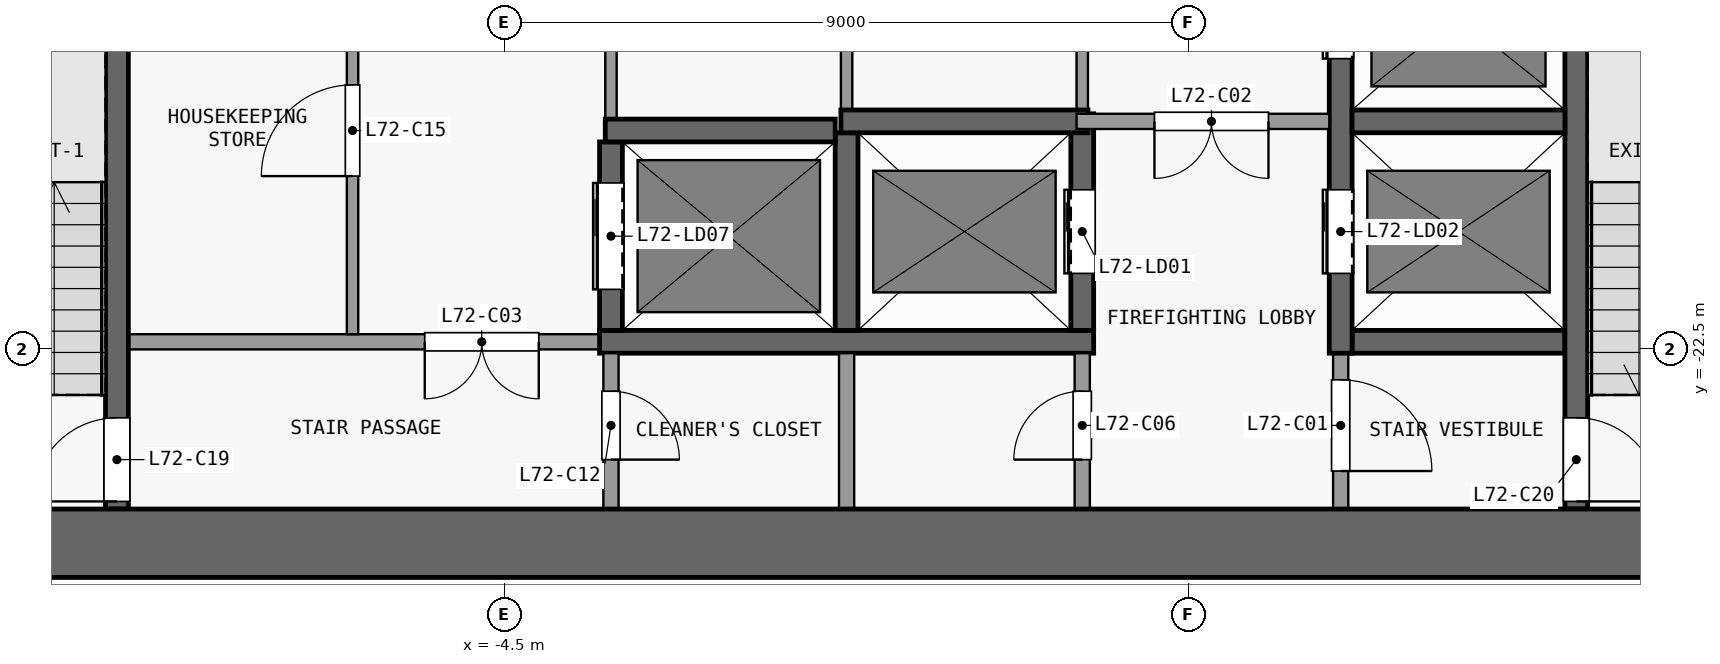
"""IFC4 building model, lengths in metres.
Left out: names, types, materials, properties, quantities, classifications, styles, units other than length and angle.
Written with IfcOpenShell. Run it as: python <this file> out.ifc"""

import sys

from ifc_helpers import new_model, si_unit, direction, frame, frame_2d, origin, place, context, subcontext, project, spatial, rectangle, extrude, element, fill, save


model = new_model("IFC4")
c1 = context("Model", 3, precision=1e-05, world=origin(), true_north=direction((0.0, 1.0)))
c2 = subcontext(c1, "Body", "Model", "MODEL_VIEW")
j1 = project(units=[si_unit("LENGTHUNIT", "METRE"), si_unit("PLANEANGLEUNIT", "RADIAN")], contexts=[c1])
p1 = place(None, origin())
s1 = spatial("IfcSite", under=j1, at=p1, CompositionType="ELEMENT")
p2 = place(p1, origin())
s2 = spatial("IfcBuilding", under=s1, at=p2, CompositionType="ELEMENT")
p3 = place(p2, frame((0.0, 0.0, 284.3)))
s3 = spatial("IfcBuildingStorey", under=s2, at=p3, CompositionType="ELEMENT", Elevation=284.3)
p4 = place(p3, frame((-13.1, -25.05, 0.0), z_axis=(0.0, 0.0, 1.0), x_axis=(1.0, 0.0, 0.0)))
e1 = element("IfcWall", 1, at=p4, inside=s3, PredefinedType="SHEAR", context=c2, shape_type="SweptSolid", body=[
    extrude(rectangle(XDim=26.2, YDim=0.9, at=frame_2d((13.1, 0.0))), origin(), (0.0, 0.0, 1.0), 3.3),
])
p5 = place(p3, frame((-3.25, -22.4, 0.0), z_axis=(0.0, 0.0, 1.0), x_axis=(-1.0, 0.0, 0.0)))
e2 = element("IfcWall", 2, at=p5, inside=s3, PredefinedType="PARTITIONING", context=c2, shape_type="SweptSolid", body=[
    extrude(rectangle(XDim=6.2, YDim=0.2, at=frame_2d((3.1, 0.0))), origin(), (0.0, 0.0, 1.0), 3.3),
])
p6 = place(p5, frame((0.8, 0.0, 0.0)))
e3 = element("IfcOpeningElement", 3, at=p6, cuts=e2, PredefinedType="OPENING", context=c2, shape_type="SweptSolid", body=[
    extrude(rectangle(XDim=1.5, YDim=2.1, at=frame_2d((0.75, 1.05))), frame((0.0, 0.11, 0.0), z_axis=(0.0, -1.0, 0.0), x_axis=(1.0, 0.0, 0.0)), (0.0, 0.0, 1.0), 0.22),
])
p7 = place(p3, frame((-3.25, -22.4, 0.0), z_axis=(0.0, 0.0, 1.0), x_axis=(1.0, 0.0, 0.0)))
e4 = element("IfcWall", 4, at=p7, inside=s3, PredefinedType="SHEAR", context=c2, shape_type="SweptSolid", body=[
    extrude(rectangle(XDim=6.5, YDim=0.3, at=frame_2d((3.25, 0.0))), origin(), (0.0, 0.0, 1.0), 3.3),
])
p8 = place(p3, frame((6.65, -22.4, 0.0), z_axis=(0.0, 0.0, 1.0), x_axis=(1.0, 0.0, 0.0)))
e5 = element("IfcWall", 5, at=p8, inside=s3, PredefinedType="SHEAR", context=c2, shape_type="SweptSolid", body=[
    extrude(rectangle(XDim=2.8, YDim=0.3, at=frame_2d((1.4, 0.0))), origin(), (0.0, 0.0, 1.0), 3.3),
])
p9 = place(p3, frame((-3.175, -19.62, 0.0), z_axis=(0.0, 0.0, 1.0), x_axis=(1.0, 0.0, 0.0)))
e6 = element("IfcWall", 6, at=p9, inside=s3, PredefinedType="SHEAR", context=c2, shape_type="SweptSolid", body=[
    extrude(rectangle(XDim=3.025, YDim=0.3, at=frame_2d((1.513, 0.0))), origin(), (0.0, 0.0, 1.0), 3.3),
])
p10 = place(p3, frame((-0.075, -19.5, 0.0), z_axis=(0.0, 0.0, 1.0), x_axis=(1.0, 0.0, 0.0)))
e7 = element("IfcWall", 7, at=p10, inside=s3, PredefinedType="SHEAR", context=c2, shape_type="SweptSolid", body=[
    extrude(rectangle(XDim=3.25, YDim=0.3, at=frame_2d((1.625, 0.0))), origin(), (0.0, 0.0, 1.0), 3.3),
])
p11 = place(p3, frame((6.35, -19.5, 0.0), z_axis=(0.0, 0.0, 1.0), x_axis=(-1.0, 0.0, 0.0)))
e8 = element("IfcWall", 8, at=p11, inside=s3, PredefinedType="PARTITIONING", context=c2, shape_type="SweptSolid", body=[
    extrude(rectangle(XDim=3.325, YDim=0.2, at=frame_2d((1.663, 0.0))), origin(), (0.0, 0.0, 1.0), 3.3),
])
p12 = place(p11, frame((0.8, 0.0, 0.0)))
e9 = element("IfcOpeningElement", 9, at=p12, cuts=e8, PredefinedType="OPENING", context=c2, shape_type="SweptSolid", body=[
    extrude(rectangle(XDim=1.5, YDim=2.1, at=frame_2d((0.75, 1.05))), frame((0.0, 0.11, 0.0), z_axis=(0.0, -1.0, 0.0), x_axis=(1.0, 0.0, 0.0)), (0.0, 0.0, 1.0), 0.22),
])
p13 = place(p3, frame((6.65, -19.5, 0.0), z_axis=(0.0, 0.0, 1.0), x_axis=(1.0, 0.0, 0.0)))
e10 = element("IfcWall", 10, at=p13, inside=s3, PredefinedType="SHEAR", context=c2, shape_type="SweptSolid", body=[
    extrude(rectangle(XDim=2.8, YDim=0.3, at=frame_2d((1.4, 0.0))), origin(), (0.0, 0.0, 1.0), 3.3),
])
p14 = place(p3, frame((-9.6, -24.6, 0.0), z_axis=(0.0, 0.0, 1.0), x_axis=(0.0, 1.0, 0.0)))
e11 = element("IfcWall", 11, at=p14, inside=s3, PredefinedType="SHEAR", context=c2, shape_type="SweptSolid", body=[
    extrude(rectangle(XDim=7.7, YDim=0.3, at=frame_2d((3.85, 0.0))), origin(), (0.0, 0.0, 1.0), 3.3),
])
p15 = place(p14, frame((0.1, 0.0, 0.0)))
e12 = element("IfcOpeningElement", 12, at=p15, cuts=e11, PredefinedType="OPENING", context=c2, shape_type="SweptSolid", body=[
    extrude(rectangle(XDim=1.1, YDim=2.1, at=frame_2d((0.55, 1.05))), frame((0.0, 0.16, 0.0), z_axis=(0.0, -1.0, 0.0), x_axis=(1.0, 0.0, 0.0)), (0.0, 0.0, 1.0), 0.32),
])
p16 = place(p3, frame((-6.5, -22.3, 0.0), z_axis=(0.0, 0.0, 1.0), x_axis=(0.0, 1.0, 0.0)))
e13 = element("IfcWall", 13, at=p16, inside=s3, PredefinedType="PARTITIONING", context=c2, shape_type="SweptSolid", body=[
    extrude(rectangle(XDim=8.14, YDim=0.15, at=frame_2d((4.07, 0.0))), origin(), (0.0, 0.0, 1.0), 3.3),
])
p17 = place(p16, frame((2.08, 0.0, 0.0)))
e14 = element("IfcOpeningElement", 14, at=p17, cuts=e13, PredefinedType="OPENING", context=c2, shape_type="SweptSolid", body=[
    extrude(rectangle(XDim=1.2, YDim=2.1, at=frame_2d((0.6, 1.05))), frame((0.0, 0.085, 0.0), z_axis=(0.0, -1.0, 0.0), x_axis=(1.0, 0.0, 0.0)), (0.0, 0.0, 1.0), 0.17),
])
p18 = place(p16, frame((6.4, 0.0, 0.0)))
e15 = element("IfcOpeningElement", 15, at=p18, cuts=e13, PredefinedType="OPENING", context=c2, shape_type="SweptSolid", body=[
    extrude(rectangle(XDim=0.9, YDim=2.1, at=frame_2d((0.45, 1.05))), frame((0.0, 0.085, 0.0), z_axis=(0.0, -1.0, 0.0), x_axis=(1.0, 0.0, 0.0)), (0.0, 0.0, 1.0), 0.17),
])
p19 = place(p3, frame((-3.1, -22.55, 0.0), z_axis=(0.0, 0.0, 1.0), x_axis=(0.0, -1.0, 0.0)))
e16 = element("IfcWall", 16, at=p19, inside=s3, PredefinedType="PARTITIONING", context=c2, shape_type="SweptSolid", body=[
    extrude(rectangle(XDim=2.05, YDim=0.2, at=frame_2d((1.025, 0.0))), origin(), (0.0, 0.0, 1.0), 3.3),
])
p20 = place(p19, frame((0.5, 0.0, 0.0)))
e17 = element("IfcOpeningElement", 17, at=p20, cuts=e16, PredefinedType="OPENING", context=c2, shape_type="SweptSolid", body=[
    extrude(rectangle(XDim=0.9, YDim=2.1, at=frame_2d((0.45, 1.05))), frame((0.0, 0.11, 0.0), z_axis=(0.0, -1.0, 0.0), x_axis=(1.0, 0.0, 0.0)), (0.0, 0.0, 1.0), 0.22),
])
p21 = place(p3, frame((-3.1, -22.25, 0.0), z_axis=(0.0, 0.0, 1.0), x_axis=(0.0, 1.0, 0.0)))
e18 = element("IfcWall", 18, at=p21, inside=s3, PredefinedType="SHEAR", context=c2, shape_type="SweptSolid", body=[
    extrude(rectangle(XDim=2.48, YDim=0.3, at=frame_2d((1.24, 0.0))), origin(), (0.0, 0.0, 1.0), 3.3),
])
p22 = place(p21, frame((0.54, 0.0, 0.0)))
e19 = element("IfcOpeningElement", 19, at=p22, cuts=e18, PredefinedType="OPENING", context=c2, shape_type="SweptSolid", body=[
    extrude(rectangle(XDim=1.4, YDim=2.1, at=frame_2d((0.7, 1.05))), frame((0.0, 0.16, 0.0), z_axis=(0.0, -1.0, 0.0), x_axis=(1.0, 0.0, 0.0)), (0.0, 0.0, 1.0), 0.32),
])
p23 = place(p3, frame((-3.1, -8.5, 0.0), z_axis=(0.0, 0.0, 1.0), x_axis=(0.0, -1.0, 0.0)))
e20 = element("IfcWall", 20, at=p23, inside=s3, PredefinedType="PARTITIONING", context=c2, shape_type="SweptSolid", body=[
    extrude(rectangle(XDim=10.97, YDim=0.15, at=frame_2d((5.485, 0.0))), origin(), (0.0, 0.0, 1.0), 3.3),
])
p24 = place(p23, frame((4.96, 0.0, 0.0)))
e21 = element("IfcOpeningElement", 21, at=p24, cuts=e20, PredefinedType="OPENING", context=c2, shape_type="SweptSolid", body=[
    extrude(rectangle(XDim=1.2, YDim=2.1, at=frame_2d((0.6, 1.05))), frame((0.0, 0.085, 0.0), z_axis=(0.0, -1.0, 0.0), x_axis=(1.0, 0.0, 0.0)), (0.0, 0.0, 1.0), 0.17),
])
p25 = place(p3, frame((0.0, -24.6, 0.0), z_axis=(0.0, 0.0, 1.0), x_axis=(0.0, 1.0, 0.0)))
e22 = element("IfcWall", 22, at=p25, inside=s3, PredefinedType="PARTITIONING", context=c2, shape_type="SweptSolid", body=[
    extrude(rectangle(XDim=2.05, YDim=0.2, at=frame_2d((1.025, 0.0))), origin(), (0.0, 0.0, 1.0), 3.3),
])
p26 = place(p3, frame((0.0, -22.25, 0.0), z_axis=(0.0, 0.0, 1.0), x_axis=(0.0, 1.0, 0.0)))
e23 = element("IfcWall", 23, at=p26, inside=s3, PredefinedType="SHEAR", context=c2, shape_type="SweptSolid", body=[
    extrude(rectangle(XDim=2.6, YDim=0.3, at=frame_2d((1.3, 0.0))), origin(), (0.0, 0.0, 1.0), 3.3),
])
p27 = place(p3, frame((0.0, -19.35, 0.0), z_axis=(0.0, 0.0, 1.0), x_axis=(0.0, 1.0, 0.0)))
e24 = element("IfcWall", 24, at=p27, inside=s3, PredefinedType="PARTITIONING", context=c2, shape_type="SweptSolid", body=[
    extrude(rectangle(XDim=10.85, YDim=0.15, at=frame_2d((5.425, 0.0))), origin(), (0.0, 0.0, 1.0), 3.3),
])
p28 = place(p3, frame((3.1, -24.6, 0.0), z_axis=(0.0, 0.0, 1.0), x_axis=(0.0, 1.0, 0.0)))
e25 = element("IfcWall", 25, at=p28, inside=s3, PredefinedType="PARTITIONING", context=c2, shape_type="SweptSolid", body=[
    extrude(rectangle(XDim=2.05, YDim=0.2, at=frame_2d((1.025, 0.0))), origin(), (0.0, 0.0, 1.0), 3.3),
])
p29 = place(p28, frame((0.65, 0.0, 0.0)))
e26 = element("IfcOpeningElement", 26, at=p29, cuts=e25, PredefinedType="OPENING", context=c2, shape_type="SweptSolid", body=[
    extrude(rectangle(XDim=0.9, YDim=2.1, at=frame_2d((0.45, 1.05))), frame((0.0, 0.11, 0.0), z_axis=(0.0, -1.0, 0.0), x_axis=(1.0, 0.0, 0.0)), (0.0, 0.0, 1.0), 0.22),
])
p30 = place(p3, frame((3.1, -22.25, 0.0), z_axis=(0.0, 0.0, 1.0), x_axis=(0.0, 1.0, 0.0)))
e27 = element("IfcWall", 27, at=p30, inside=s3, PredefinedType="SHEAR", context=c2, shape_type="SweptSolid", body=[
    extrude(rectangle(XDim=2.85, YDim=0.3, at=frame_2d((1.425, 0.0))), origin(), (0.0, 0.0, 1.0), 3.3),
])
p31 = place(p30, frame((0.75, 0.0, 0.0)))
e28 = element("IfcOpeningElement", 28, at=p31, cuts=e27, PredefinedType="OPENING", context=c2, shape_type="SweptSolid", body=[
    extrude(rectangle(XDim=1.1, YDim=2.1, at=frame_2d((0.55, 1.05))), frame((0.0, 0.16, 0.0), z_axis=(0.0, -1.0, 0.0), x_axis=(1.0, 0.0, 0.0)), (0.0, 0.0, 1.0), 0.32),
])
p32 = place(p3, frame((3.1, -19.4, 0.0), z_axis=(0.0, 0.0, 1.0), x_axis=(0.0, 1.0, 0.0)))
e29 = element("IfcWall", 29, at=p32, inside=s3, PredefinedType="PARTITIONING", context=c2, shape_type="SweptSolid", body=[
    extrude(rectangle(XDim=10.9, YDim=0.15, at=frame_2d((5.45, 0.0))), origin(), (0.0, 0.0, 1.0), 3.3),
])
p33 = place(p32, frame((4.8, 0.0, 0.0)))
e30 = element("IfcOpeningElement", 30, at=p33, cuts=e29, PredefinedType="OPENING", context=c2, shape_type="SweptSolid", body=[
    extrude(rectangle(XDim=1.2, YDim=2.1, at=frame_2d((0.6, 1.05))), frame((0.0, 0.085, 0.0), z_axis=(0.0, -1.0, 0.0), x_axis=(1.0, 0.0, 0.0)), (0.0, 0.0, 1.0), 0.17),
])
p34 = place(p3, frame((6.5, -22.55, 0.0), z_axis=(0.0, 0.0, 1.0), x_axis=(0.0, -1.0, 0.0)))
e31 = element("IfcWall", 31, at=p34, inside=s3, PredefinedType="PARTITIONING", context=c2, shape_type="SweptSolid", body=[
    extrude(rectangle(XDim=2.05, YDim=0.2, at=frame_2d((1.025, 0.0))), origin(), (0.0, 0.0, 1.0), 3.3),
])
p35 = place(p34, frame((0.35, 0.0, 0.0)))
e32 = element("IfcOpeningElement", 32, at=p35, cuts=e31, PredefinedType="OPENING", context=c2, shape_type="SweptSolid", body=[
    extrude(rectangle(XDim=1.2, YDim=2.1, at=frame_2d((0.6, 1.05))), frame((0.0, 0.11, 0.0), z_axis=(0.0, -1.0, 0.0), x_axis=(1.0, 0.0, 0.0)), (0.0, 0.0, 1.0), 0.22),
])
p36 = place(p3, frame((6.5, -22.55, 0.0), z_axis=(0.0, 0.0, 1.0), x_axis=(0.0, 1.0, 0.0)))
e33 = element("IfcWall", 33, at=p36, inside=s3, PredefinedType="SHEAR", context=c2, shape_type="SweptSolid", body=[
    extrude(rectangle(XDim=14.05, YDim=0.3, at=frame_2d((7.025, 0.0))), origin(), (0.0, 0.0, 1.0), 3.3),
])
p37 = place(p36, frame((1.05, 0.0, 0.0)))
e34 = element("IfcOpeningElement", 34, at=p37, cuts=e33, PredefinedType="OPENING", context=c2, shape_type="SweptSolid", body=[
    extrude(rectangle(XDim=1.1, YDim=2.1, at=frame_2d((0.55, 1.05))), frame((0.0, 0.16, 0.0), z_axis=(0.0, -1.0, 0.0), x_axis=(1.0, 0.0, 0.0)), (0.0, 0.0, 1.0), 0.32),
])
p38 = place(p36, frame((3.875, 0.0, 0.0)))
e35 = element("IfcOpeningElement", 35, at=p38, cuts=e33, PredefinedType="OPENING", context=c2, shape_type="SweptSolid", body=[
    extrude(rectangle(XDim=1.1, YDim=2.1, at=frame_2d((0.55, 1.05))), frame((0.0, 0.16, 0.0), z_axis=(0.0, -1.0, 0.0), x_axis=(1.0, 0.0, 0.0)), (0.0, 0.0, 1.0), 0.32),
])
p39 = place(p36, frame((6.625, 0.0, 0.0)))
e36 = element("IfcOpeningElement", 36, at=p39, cuts=e33, PredefinedType="OPENING", context=c2, shape_type="SweptSolid", body=[
    extrude(rectangle(XDim=1.1, YDim=2.1, at=frame_2d((0.55, 1.05))), frame((0.0, 0.16, 0.0), z_axis=(0.0, -1.0, 0.0), x_axis=(1.0, 0.0, 0.0)), (0.0, 0.0, 1.0), 0.32),
])
p40 = place(p36, frame((9.375, 0.0, 0.0)))
e37 = element("IfcOpeningElement", 37, at=p40, cuts=e33, PredefinedType="OPENING", context=c2, shape_type="SweptSolid", body=[
    extrude(rectangle(XDim=1.1, YDim=2.1, at=frame_2d((0.55, 1.05))), frame((0.0, 0.16, 0.0), z_axis=(0.0, -1.0, 0.0), x_axis=(1.0, 0.0, 0.0)), (0.0, 0.0, 1.0), 0.32),
])
p41 = place(p36, frame((12.125, 0.0, 0.0)))
e38 = element("IfcOpeningElement", 38, at=p41, cuts=e33, PredefinedType="OPENING", context=c2, shape_type="SweptSolid", body=[
    extrude(rectangle(XDim=1.1, YDim=2.1, at=frame_2d((0.55, 1.05))), frame((0.0, 0.16, 0.0), z_axis=(0.0, -1.0, 0.0), x_axis=(1.0, 0.0, 0.0)), (0.0, 0.0, 1.0), 0.32),
])
p42 = place(p3, frame((9.6, -16.9, 0.0), z_axis=(0.0, 0.0, 1.0), x_axis=(0.0, -1.0, 0.0)))
e39 = element("IfcWall", 39, at=p42, inside=s3, PredefinedType="SHEAR", context=c2, shape_type="SweptSolid", body=[
    extrude(rectangle(XDim=7.7, YDim=0.3, at=frame_2d((3.85, 0.0))), origin(), (0.0, 0.0, 1.0), 3.3),
])
p43 = place(p42, frame((6.5, 0.0, 0.0)))
e40 = element("IfcOpeningElement", 40, at=p43, cuts=e39, PredefinedType="OPENING", context=c2, shape_type="SweptSolid", body=[
    extrude(rectangle(XDim=1.1, YDim=2.1, at=frame_2d((0.55, 1.05))), frame((0.0, 0.16, 0.0), z_axis=(0.0, -1.0, 0.0), x_axis=(1.0, 0.0, 0.0)), (0.0, 0.0, 1.0), 0.32),
])
p44 = place(p31, origin())
e41 = element("IfcDoor", 41, at=p44, inside=s3, OperationType="DOUBLE_DOOR_SLIDING", PredefinedType="DOOR", context=c2, shape_type="SweptSolid", body=[
    extrude(rectangle(XDim=1.1, YDim=2.1, at=frame_2d((0.55, 1.05))), frame((0.0, 0.025, 0.0), z_axis=(0.0, -1.0, 0.0), x_axis=(1.0, 0.0, 0.0)), (0.0, 0.0, 1.0), 0.05),
])
fill(e28, e41)
p45 = place(p37, origin())
e42 = element("IfcDoor", 42, at=p45, inside=s3, OperationType="DOUBLE_DOOR_SLIDING", PredefinedType="DOOR", context=c2, shape_type="SweptSolid", body=[
    extrude(rectangle(XDim=1.1, YDim=2.1, at=frame_2d((0.55, 1.05))), frame((0.0, 0.025, 0.0), z_axis=(0.0, -1.0, 0.0), x_axis=(1.0, 0.0, 0.0)), (0.0, 0.0, 1.0), 0.05),
])
fill(e34, e42)
p46 = place(p38, origin())
e43 = element("IfcDoor", 43, at=p46, inside=s3, OperationType="DOUBLE_DOOR_SLIDING", PredefinedType="DOOR", context=c2, shape_type="SweptSolid", body=[
    extrude(rectangle(XDim=1.1, YDim=2.1, at=frame_2d((0.55, 1.05))), frame((0.0, 0.025, 0.0), z_axis=(0.0, -1.0, 0.0), x_axis=(1.0, 0.0, 0.0)), (0.0, 0.0, 1.0), 0.05),
])
fill(e35, e43)
p47 = place(p22, origin())
e44 = element("IfcDoor", 44, at=p47, inside=s3, OperationType="DOUBLE_DOOR_SLIDING", PredefinedType="DOOR", context=c2, shape_type="SweptSolid", body=[
    extrude(rectangle(XDim=1.4, YDim=2.1, at=frame_2d((0.7, 1.05))), frame((0.0, 0.025, 0.0), z_axis=(0.0, -1.0, 0.0), x_axis=(1.0, 0.0, 0.0)), (0.0, 0.0, 1.0), 0.05),
])
fill(e19, e44)
p48 = place(p35, origin())
e45 = element("IfcDoor", 45, at=p48, inside=s3, OperationType="SINGLE_SWING_RIGHT", PredefinedType="DOOR", context=c2, shape_type="SweptSolid", body=[
    extrude(rectangle(XDim=1.2, YDim=2.1, at=frame_2d((0.6, 1.05))), frame((0.0, 0.025, 0.0), z_axis=(0.0, -1.0, 0.0), x_axis=(1.0, 0.0, 0.0)), (0.0, 0.0, 1.0), 0.05),
])
fill(e32, e45)
p49 = place(p12, origin())
e46 = element("IfcDoor", 46, at=p49, inside=s3, OperationType="DOUBLE_DOOR_SINGLE_SWING", PredefinedType="DOOR", context=c2, shape_type="SweptSolid", body=[
    extrude(rectangle(XDim=1.5, YDim=2.1, at=frame_2d((0.75, 1.05))), frame((0.0, 0.025, 0.0), z_axis=(0.0, -1.0, 0.0), x_axis=(1.0, 0.0, 0.0)), (0.0, 0.0, 1.0), 0.05),
])
fill(e9, e46)
p50 = place(p6, origin())
e47 = element("IfcDoor", 47, at=p50, inside=s3, OperationType="DOUBLE_DOOR_SINGLE_SWING", PredefinedType="DOOR", context=c2, shape_type="SweptSolid", body=[
    extrude(rectangle(XDim=1.5, YDim=2.1, at=frame_2d((0.75, 1.05))), frame((0.0, 0.025, 0.0), z_axis=(0.0, -1.0, 0.0), x_axis=(1.0, 0.0, 0.0)), (0.0, 0.0, 1.0), 0.05),
])
fill(e3, e47)
p51 = place(p29, origin())
e48 = element("IfcDoor", 48, at=p51, inside=s3, OperationType="SINGLE_SWING_LEFT", PredefinedType="DOOR", context=c2, shape_type="SweptSolid", body=[
    extrude(rectangle(XDim=0.9, YDim=2.1, at=frame_2d((0.45, 1.05))), frame((0.0, 0.025, 0.0), z_axis=(0.0, -1.0, 0.0), x_axis=(1.0, 0.0, 0.0)), (0.0, 0.0, 1.0), 0.05),
])
fill(e26, e48)
p52 = place(p20, origin())
e49 = element("IfcDoor", 49, at=p52, inside=s3, OperationType="SINGLE_SWING_RIGHT", PredefinedType="DOOR", context=c2, shape_type="SweptSolid", body=[
    extrude(rectangle(XDim=0.9, YDim=2.1, at=frame_2d((0.45, 1.05))), frame((0.0, 0.025, 0.0), z_axis=(0.0, -1.0, 0.0), x_axis=(1.0, 0.0, 0.0)), (0.0, 0.0, 1.0), 0.05),
])
fill(e17, e49)
p53 = place(p17, origin())
e50 = element("IfcDoor", 50, at=p53, inside=s3, OperationType="SINGLE_SWING_LEFT", PredefinedType="DOOR", context=c2, shape_type="SweptSolid", body=[
    extrude(rectangle(XDim=1.2, YDim=2.1, at=frame_2d((0.6, 1.05))), frame((0.0, 0.025, 0.0), z_axis=(0.0, -1.0, 0.0), x_axis=(1.0, 0.0, 0.0)), (0.0, 0.0, 1.0), 0.05),
])
fill(e14, e50)
p54 = place(p15, origin())
e51 = element("IfcDoor", 51, at=p54, inside=s3, OperationType="SINGLE_SWING_LEFT", PredefinedType="DOOR", context=c2, shape_type="SweptSolid", body=[
    extrude(rectangle(XDim=1.1, YDim=2.1, at=frame_2d((0.55, 1.05))), frame((0.0, 0.025, 0.0), z_axis=(0.0, -1.0, 0.0), x_axis=(1.0, 0.0, 0.0)), (0.0, 0.0, 1.0), 0.05),
])
fill(e12, e51)
p55 = place(p43, origin())
e52 = element("IfcDoor", 52, at=p55, inside=s3, OperationType="SINGLE_SWING_RIGHT", PredefinedType="DOOR", context=c2, shape_type="SweptSolid", body=[
    extrude(rectangle(XDim=1.1, YDim=2.1, at=frame_2d((0.55, 1.05))), frame((0.0, 0.025, 0.0), z_axis=(0.0, -1.0, 0.0), x_axis=(1.0, 0.0, 0.0)), (0.0, 0.0, 1.0), 0.05),
])
fill(e40, e52)
save(model, sys.argv[1])
